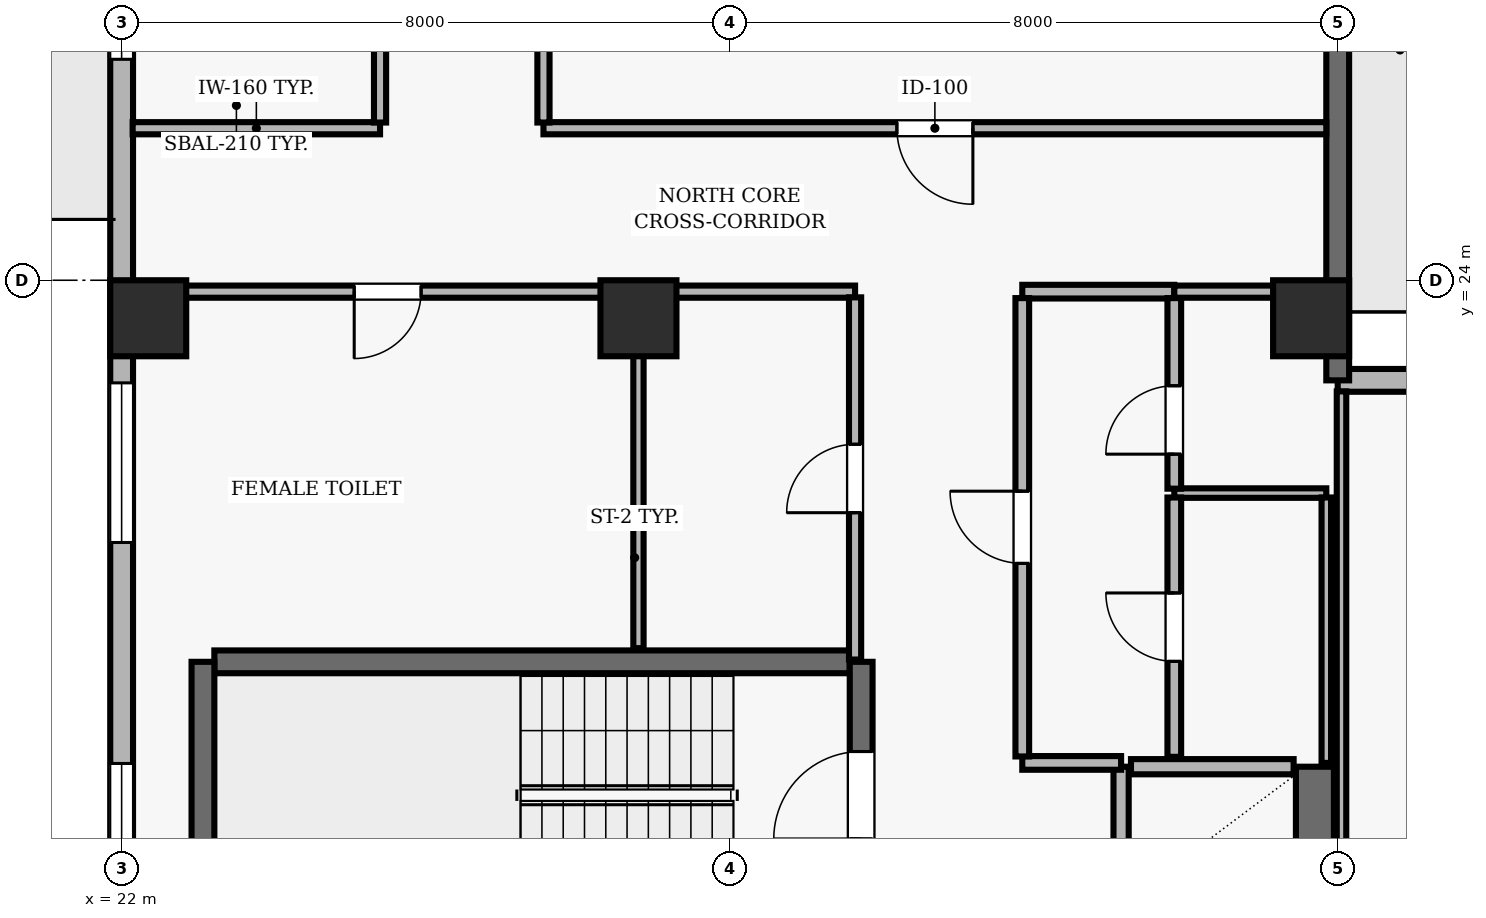
"""IFC4 building model, lengths in metres.
Left out: names, types, materials, properties, quantities, classifications, styles, units other than length and angle.
Written with IfcOpenShell. Run it as: python <this file> out.ifc"""

import sys

from ifc_helpers import new_model, si_unit, direction, frame, frame_2d, origin, origin_2d, place, context, subcontext, project, spatial, rectangle, extrude, element, fill, save


model = new_model("IFC4")
c1 = context("Model", 3, precision=1e-05, world=origin(), true_north=direction((0.0, 1.0)))
c2 = subcontext(c1, "Body", "Model", "MODEL_VIEW")
j1 = project(units=[si_unit("LENGTHUNIT", "METRE"), si_unit("PLANEANGLEUNIT", "RADIAN")], contexts=[c1])
p1 = place(None, origin())
s1 = spatial("IfcSite", under=j1, at=p1, CompositionType="ELEMENT")
p2 = place(p1, origin())
s2 = spatial("IfcBuilding", under=s1, at=p2, CompositionType="ELEMENT")
p3 = place(p2, frame((0.0, 0.0, 210.9)))
s3 = spatial("IfcBuildingStorey", under=s2, at=p3, CompositionType="ELEMENT", Elevation=210.9)
for number, where, z_axis, x_axis in (
    (1, (22.35, 23.5, 0.0), (0.0, 0.0, 1.0), (1.0, 0.0, 0.0)),
    (2, (28.8, 23.5, 0.0), (0.0, 0.0, 1.0), (1.0, 0.0, 0.0)),
    (3, (37.65, 23.5, 0.0), (0.0, 0.0, 1.0), (1.0, 0.0, 0.0)),
):
    element("IfcColumn", number, at=place(p3, frame(where, z_axis=z_axis, x_axis=x_axis)), inside=s3, PredefinedType="COLUMN", context=c2, shape_type="SweptSolid", body=[
        extrude(rectangle(XDim=1.0, YDim=1.0, at=origin_2d()), origin(), (0.0, 0.0, 1.0), 3.9),
    ])
p4 = place(p3, frame((44.45, 22.683, 0.0), z_axis=(0.0, 0.0, 1.0), x_axis=(-1.0, 0.0, 0.0)))
e4 = element("IfcWall", 4, at=p4, inside=s3, PredefinedType="SOLIDWALL", context=c2, shape_type="SweptSolid", body=[
    extrude(rectangle(XDim=6.45, YDim=0.3, at=frame_2d((3.225, 0.0))), origin(), (0.0, 0.0, 1.0), 3.69),
])
p5 = place(p4, frame((2.025, 0.0, 0.9)))
e5 = element("IfcOpeningElement", 5, at=p5, cuts=e4, PredefinedType="OPENING", context=c2, shape_type="SweptSolid", body=[
    extrude(rectangle(XDim=2.4, YDim=2.2, at=frame_2d((1.2, 1.1))), frame((0.0, 0.16, 0.0), z_axis=(0.0, -1.0, 0.0), x_axis=(1.0, 0.0, 0.0)), (0.0, 0.0, 1.0), 0.32),
])
p6 = place(p3, frame((38.0, 22.683, 0.0), z_axis=(0.0, 0.0, 1.0), x_axis=(0.0, 1.0, 0.0)))
e6 = element("IfcWall", 6, at=p6, inside=s3, PredefinedType="SOLIDWALL", context=c2, shape_type="SweptSolid", body=[
    extrude(rectangle(XDim=18.017, YDim=0.3, at=frame_2d((9.008, 0.0))), origin(), (0.0, 0.0, 1.0), 3.69),
])
p7 = place(p6, frame((9.708, 0.0, 0.0)))
e7 = element("IfcOpeningElement", 7, at=p7, cuts=e6, PredefinedType="OPENING", context=c2, shape_type="SweptSolid", body=[
    extrude(rectangle(XDim=1.0, YDim=2.2, at=frame_2d((0.5, 1.1))), frame((0.0, 0.16, 0.0), z_axis=(0.0, -1.0, 0.0), x_axis=(1.0, 0.0, 0.0)), (0.0, 0.0, 1.0), 0.32),
])
p8 = place(p6, frame((13.964, 0.0, 0.9)))
e8 = element("IfcOpeningElement", 8, at=p8, cuts=e6, PredefinedType="OPENING", context=c2, shape_type="SweptSolid", body=[
    extrude(rectangle(XDim=3.0, YDim=2.2, at=frame_2d((1.5, 1.1))), frame((0.0, 0.16, 0.0), z_axis=(0.0, -1.0, 0.0), x_axis=(1.0, 0.0, 0.0)), (0.0, 0.0, 1.0), 0.32),
])
p9 = place(p3, frame((22.0, 40.7, 0.0), z_axis=(0.0, 0.0, 1.0), x_axis=(0.0, -1.0, 0.0)))
e9 = element("IfcWall", 9, at=p9, inside=s3, PredefinedType="SOLIDWALL", context=c2, shape_type="SweptSolid", body=[
    extrude(rectangle(XDim=38.2, YDim=0.3, at=frame_2d((19.1, 0.0))), origin(), (0.0, 0.0, 1.0), 3.69),
])
p10 = place(p9, frame((7.8, 0.0, 0.0)))
e10 = element("IfcOpeningElement", 10, at=p10, cuts=e9, PredefinedType="OPENING", context=c2, shape_type="SweptSolid", body=[
    extrude(rectangle(XDim=1.0, YDim=2.2, at=frame_2d((0.5, 1.1))), frame((0.0, 0.16, 0.0), z_axis=(0.0, -1.0, 0.0), x_axis=(1.0, 0.0, 0.0)), (0.0, 0.0, 1.0), 0.32),
])
p11 = place(p9, frame((1.679, 0.0, 0.9)))
e11 = element("IfcOpeningElement", 11, at=p11, cuts=e9, PredefinedType="OPENING", context=c2, shape_type="SweptSolid", body=[
    extrude(rectangle(XDim=2.1, YDim=1.6, at=frame_2d((1.05, 0.8))), frame((0.0, 0.16, 0.0), z_axis=(0.0, -1.0, 0.0), x_axis=(1.0, 0.0, 0.0)), (0.0, 0.0, 1.0), 0.32),
])
p12 = place(p9, frame((11.693, 0.0, 0.9)))
e12 = element("IfcOpeningElement", 12, at=p12, cuts=e9, PredefinedType="OPENING", context=c2, shape_type="SweptSolid", body=[
    extrude(rectangle(XDim=2.1, YDim=1.6, at=frame_2d((1.05, 0.8))), frame((0.0, 0.16, 0.0), z_axis=(0.0, -1.0, 0.0), x_axis=(1.0, 0.0, 0.0)), (0.0, 0.0, 1.0), 0.32),
])
p13 = place(p9, frame((18.05, 0.0, 0.9)))
e13 = element("IfcOpeningElement", 13, at=p13, cuts=e9, PredefinedType="OPENING", context=c2, shape_type="SweptSolid", body=[
    extrude(rectangle(XDim=2.1, YDim=1.6, at=frame_2d((1.05, 0.8))), frame((0.0, 0.16, 0.0), z_axis=(0.0, -1.0, 0.0), x_axis=(1.0, 0.0, 0.0)), (0.0, 0.0, 1.0), 0.32),
])
p14 = place(p9, frame((23.057, 0.0, 0.9)))
e14 = element("IfcOpeningElement", 14, at=p14, cuts=e9, PredefinedType="OPENING", context=c2, shape_type="SweptSolid", body=[
    extrude(rectangle(XDim=2.1, YDim=1.6, at=frame_2d((1.05, 0.8))), frame((0.0, 0.16, 0.0), z_axis=(0.0, -1.0, 0.0), x_axis=(1.0, 0.0, 0.0)), (0.0, 0.0, 1.0), 0.32),
])
p15 = place(p9, frame((28.964, 0.0, 0.9)))
e15 = element("IfcOpeningElement", 15, at=p15, cuts=e9, PredefinedType="OPENING", context=c2, shape_type="SweptSolid", body=[
    extrude(rectangle(XDim=2.1, YDim=1.6, at=frame_2d((1.05, 0.8))), frame((0.0, 0.16, 0.0), z_axis=(0.0, -1.0, 0.0), x_axis=(1.0, 0.0, 0.0)), (0.0, 0.0, 1.0), 0.32),
])
p16 = place(p3, frame((31.58, 18.98, 0.0), z_axis=(0.0, 0.0, 1.0), x_axis=(-1.0, 0.0, 0.0)))
e16 = element("IfcWall", 16, at=p16, inside=s3, PredefinedType="SHEAR", context=c2, shape_type="SweptSolid", body=[
    extrude(rectangle(XDim=8.36, YDim=0.3, at=frame_2d((4.18, 0.0))), origin(), (0.0, 0.0, 1.0), 3.69),
])
p17 = place(p3, frame((23.07, 18.98, 0.0), z_axis=(0.0, 0.0, 1.0), x_axis=(0.0, -1.0, 0.0)))
e17 = element("IfcWall", 17, at=p17, inside=s3, PredefinedType="SHEAR", context=c2, shape_type="SweptSolid", body=[
    extrude(rectangle(XDim=3.51, YDim=0.3, at=frame_2d((1.755, 0.0))), origin(), (0.0, 0.0, 1.0), 3.69),
])
p18 = place(p3, frame((31.73, 15.47, 0.0), z_axis=(0.0, 0.0, 1.0), x_axis=(0.0, 1.0, 0.0)))
e18 = element("IfcWall", 18, at=p18, inside=s3, PredefinedType="SHEAR", context=c2, shape_type="SweptSolid", body=[
    extrude(rectangle(XDim=3.51, YDim=0.3, at=frame_2d((1.755, 0.0))), origin(), (0.0, 0.0, 1.0), 3.69),
])
p19 = place(p18, frame((1.18, 0.0, 0.0)))
e19 = element("IfcOpeningElement", 19, at=p19, cuts=e18, PredefinedType="OPENING", context=c2, shape_type="SweptSolid", body=[
    extrude(rectangle(XDim=1.15, YDim=2.15, at=frame_2d((0.575, 1.075))), frame((0.0, 0.16, 0.0), z_axis=(0.0, -1.0, 0.0), x_axis=(1.0, 0.0, 0.0)), (0.0, 0.0, 1.0), 0.32),
])
p20 = place(p3, frame((35.15, 17.6, 0.0), z_axis=(0.0, 0.0, 1.0), x_axis=(0.0, -1.0, 0.0)))
e20 = element("IfcWall", 20, at=p20, inside=s3, PredefinedType="SOLIDWALL", context=c2, shape_type="SweptSolid", body=[
    extrude(rectangle(XDim=1.85, YDim=0.2, at=frame_2d((0.925, 0.0))), origin(), (0.0, 0.0, 1.0), 3.69),
])
p21 = place(p3, frame((37.7, 15.75, 0.0), z_axis=(0.0, 0.0, 1.0), x_axis=(0.0, 1.0, 0.0)))
e21 = element("IfcWall", 21, at=p21, inside=s3, PredefinedType="SHEAR", context=c2, shape_type="SweptSolid", body=[
    extrude(rectangle(XDim=1.85, YDim=0.5, at=frame_2d((0.925, 0.0))), origin(), (0.0, 0.0, 1.0), 3.69),
])
p22 = place(p3, frame((37.42, 17.6, 0.0), z_axis=(0.0, 0.0, 1.0), x_axis=(-1.0, 0.0, 0.0)))
e22 = element("IfcWall", 22, at=p22, inside=s3, PredefinedType="SOLIDWALL", context=c2, shape_type="SweptSolid", body=[
    extrude(rectangle(XDim=2.14, YDim=0.2, at=frame_2d((1.07, 0.0))), origin(), (0.0, 0.0, 1.0), 3.69),
])
p23 = place(p3, frame((25.4, 26.0, 0.0), z_axis=(0.0, 0.0, 1.0), x_axis=(-1.0, 0.0, 0.0)))
e23 = element("IfcWall", 23, at=p23, inside=s3, PredefinedType="PARTITIONING", context=c2, shape_type="SweptSolid", body=[
    extrude(rectangle(XDim=3.255, YDim=0.16, at=frame_2d((1.627, 0.0))), origin(), (0.0, 0.0, 1.0), 3.69),
])
p24 = place(p3, frame((28.8, 23.85, 0.0), z_axis=(0.0, 0.0, 1.0), x_axis=(-1.0, 0.0, 0.0)))
e24 = element("IfcWall", 24, at=p24, inside=s3, PredefinedType="PARTITIONING", context=c2, shape_type="SweptSolid", body=[
    extrude(rectangle(XDim=6.6, YDim=0.16, at=frame_2d((3.3, 0.0))), origin(), (0.0, 0.0, 1.0), 3.146),
])
p25 = place(p24, frame((2.86, 0.0, 0.0)))
e25 = element("IfcOpeningElement", 25, at=p25, cuts=e24, PredefinedType="OPENING", context=c2, shape_type="SweptSolid", body=[
    extrude(rectangle(XDim=0.88, YDim=2.1, at=frame_2d((0.44, 1.05))), frame((0.0, 0.09, 0.0), z_axis=(0.0, -1.0, 0.0), x_axis=(1.0, 0.0, 0.0)), (0.0, 0.0, 1.0), 0.18),
])
p26 = place(p3, frame((31.65, 23.85, 0.0), z_axis=(0.0, 0.0, 1.0), x_axis=(-1.0, 0.0, 0.0)))
e26 = element("IfcWall", 26, at=p26, inside=s3, PredefinedType="PARTITIONING", context=c2, shape_type="SweptSolid", body=[
    extrude(rectangle(XDim=2.85, YDim=0.16, at=frame_2d((1.425, 0.0))), origin(), (0.0, 0.0, 1.0), 3.146),
])
p27 = place(p3, frame((33.85, 17.65, 0.0), z_axis=(0.0, 0.0, 1.0), x_axis=(1.0, 0.0, 0.0)))
e27 = element("IfcWall", 27, at=p27, inside=s3, PredefinedType="PARTITIONING", context=c2, shape_type="SweptSolid", body=[
    extrude(rectangle(XDim=1.3, YDim=0.18, at=frame_2d((0.65, 0.0))), origin(), (0.0, 0.0, 1.0), 3.69),
])
p28 = place(p3, frame((35.85, 21.2, 0.0), z_axis=(0.0, 0.0, 1.0), x_axis=(1.0, 0.0, 0.0)))
e28 = element("IfcWall", 28, at=p28, inside=s3, PredefinedType="PARTITIONING", context=c2, shape_type="SweptSolid", body=[
    extrude(rectangle(XDim=2.0, YDim=0.125, at=frame_2d((1.0, 0.0))), origin(), (0.0, 0.0, 1.0), 3.146),
])
p29 = place(p3, frame((35.85, 23.85, 0.0), z_axis=(0.0, 0.0, 1.0), x_axis=(-1.0, 0.0, 0.0)))
e29 = element("IfcWall", 29, at=p29, inside=s3, PredefinedType="PARTITIONING", context=c2, shape_type="SweptSolid", body=[
    extrude(rectangle(XDim=2.0, YDim=0.18, at=frame_2d((1.0, 0.0))), origin(), (0.0, 0.0, 1.0), 3.146),
])
p30 = place(p3, frame((37.85, 23.85, 0.0), z_axis=(0.0, 0.0, 1.0), x_axis=(-1.0, 0.0, 0.0)))
e30 = element("IfcWall", 30, at=p30, inside=s3, PredefinedType="PARTITIONING", context=c2, shape_type="SweptSolid", body=[
    extrude(rectangle(XDim=2.0, YDim=0.16, at=frame_2d((1.0, 0.0))), origin(), (0.0, 0.0, 1.0), 3.146),
])
p31 = place(p3, frame((37.85, 26.0, 0.0), z_axis=(0.0, 0.0, 1.0), x_axis=(-1.0, 0.0, 0.0)))
e31 = element("IfcWall", 31, at=p31, inside=s3, PredefinedType="PARTITIONING", context=c2, shape_type="SweptSolid", body=[
    extrude(rectangle(XDim=10.3, YDim=0.16, at=frame_2d((5.15, 0.0))), origin(), (0.0, 0.0, 1.0), 3.69),
])
p32 = place(p31, frame((4.65, 0.0, 0.0)))
e32 = element("IfcOpeningElement", 32, at=p32, cuts=e31, PredefinedType="OPENING", context=c2, shape_type="SweptSolid", body=[
    extrude(rectangle(XDim=1.0, YDim=2.1, at=frame_2d((0.5, 1.05))), frame((0.0, 0.09, 0.0), z_axis=(0.0, -1.0, 0.0), x_axis=(1.0, 0.0, 0.0)), (0.0, 0.0, 1.0), 0.18),
])
p33 = place(p3, frame((25.4, 35.715, 0.0), z_axis=(0.0, 0.0, 1.0), x_axis=(0.0, -1.0, 0.0)))
e33 = element("IfcWall", 33, at=p33, inside=s3, PredefinedType="PARTITIONING", context=c2, shape_type="SweptSolid", body=[
    extrude(rectangle(XDim=9.64, YDim=0.16, at=frame_2d((4.82, 0.0))), origin(), (0.0, 0.0, 1.0), 3.69),
])
p34 = place(p33, frame((4.37, 0.0, 0.0)))
e34 = element("IfcOpeningElement", 34, at=p34, cuts=e33, PredefinedType="OPENING", context=c2, shape_type="SweptSolid", body=[
    extrude(rectangle(XDim=0.9, YDim=2.1, at=frame_2d((0.45, 1.05))), frame((0.0, 0.09, 0.0), z_axis=(0.0, -1.0, 0.0), x_axis=(1.0, 0.0, 0.0)), (0.0, 0.0, 1.0), 0.18),
])
p35 = place(p3, frame((27.55, 26.075, 0.0), z_axis=(0.0, 0.0, 1.0), x_axis=(0.0, 1.0, 0.0)))
e35 = element("IfcWall", 35, at=p35, inside=s3, PredefinedType="PARTITIONING", context=c2, shape_type="SweptSolid", body=[
    extrude(rectangle(XDim=9.657, YDim=0.16, at=frame_2d((4.829, 0.0))), origin(), (0.0, 0.0, 1.0), 3.69),
])
p36 = place(p3, frame((28.8, 23.775, 0.0), z_axis=(0.0, 0.0, 1.0), x_axis=(0.0, -1.0, 0.0)))
e36 = element("IfcWall", 36, at=p36, inside=s3, PredefinedType="PARTITIONING", context=c2, shape_type="SweptSolid", body=[
    extrude(rectangle(XDim=4.615, YDim=0.135, at=frame_2d((2.308, 0.0))), origin(), (0.0, 0.0, 1.0), 3.69),
])
p37 = place(p3, frame((31.65, 19.01, 0.0), z_axis=(0.0, 0.0, 1.0), x_axis=(0.0, 1.0, 0.0)))
e37 = element("IfcWall", 37, at=p37, inside=s3, PredefinedType="PARTITIONING", context=c2, shape_type="SweptSolid", body=[
    extrude(rectangle(XDim=4.765, YDim=0.16, at=frame_2d((2.382, 0.0))), origin(), (0.0, 0.0, 1.0), 3.69),
])
p38 = place(p37, frame((1.932, 0.0, 0.0)))
e38 = element("IfcOpeningElement", 38, at=p38, cuts=e37, PredefinedType="OPENING", context=c2, shape_type="SweptSolid", body=[
    extrude(rectangle(XDim=0.9, YDim=2.1, at=frame_2d((0.45, 1.05))), frame((0.0, 0.09, 0.0), z_axis=(0.0, -1.0, 0.0), x_axis=(1.0, 0.0, 0.0)), (0.0, 0.0, 1.0), 0.18),
])
p39 = place(p3, frame((33.85, 17.735, 0.0), z_axis=(0.0, 0.0, 1.0), x_axis=(0.0, 1.0, 0.0)))
e39 = element("IfcWall", 39, at=p39, inside=s3, PredefinedType="PARTITIONING", context=c2, shape_type="SweptSolid", body=[
    extrude(rectangle(XDim=6.03, YDim=0.18, at=frame_2d((3.015, 0.0))), origin(), (0.0, 0.0, 1.0), 3.69),
])
p40 = place(p39, frame((2.54, 0.0, 0.0)))
e40 = element("IfcOpeningElement", 40, at=p40, cuts=e39, PredefinedType="OPENING", context=c2, shape_type="SweptSolid", body=[
    extrude(rectangle(XDim=0.95, YDim=2.1, at=frame_2d((0.475, 1.05))), frame((0.0, 0.1, 0.0), z_axis=(0.0, -1.0, 0.0), x_axis=(1.0, 0.0, 0.0)), (0.0, 0.0, 1.0), 0.2),
])
p41 = place(p3, frame((35.85, 17.73, 0.0), z_axis=(0.0, 0.0, 1.0), x_axis=(0.0, 1.0, 0.0)))
e41 = element("IfcWall", 41, at=p41, inside=s3, PredefinedType="PARTITIONING", context=c2, shape_type="SweptSolid", body=[
    extrude(rectangle(XDim=3.412, YDim=0.18, at=frame_2d((1.706, 0.0))), origin(), (0.0, 0.0, 1.0), 3.69),
])
p42 = place(p41, frame((1.256, 0.0, 0.0)))
e42 = element("IfcOpeningElement", 42, at=p42, cuts=e41, PredefinedType="OPENING", context=c2, shape_type="SweptSolid", body=[
    extrude(rectangle(XDim=0.9, YDim=2.1, at=frame_2d((0.45, 1.05))), frame((0.0, 0.1, 0.0), z_axis=(0.0, -1.0, 0.0), x_axis=(1.0, 0.0, 0.0)), (0.0, 0.0, 1.0), 0.2),
])
p43 = place(p3, frame((35.85, 21.258, 0.0), z_axis=(0.0, 0.0, 1.0), x_axis=(0.0, 1.0, 0.0)))
e43 = element("IfcWall", 43, at=p43, inside=s3, PredefinedType="PARTITIONING", context=c2, shape_type="SweptSolid", body=[
    extrude(rectangle(XDim=2.507, YDim=0.18, at=frame_2d((1.253, 0.0))), origin(), (0.0, 0.0, 1.0), 3.69),
])
p44 = place(p43, frame((0.454, 0.0, 0.0)))
e44 = element("IfcOpeningElement", 44, at=p44, cuts=e43, PredefinedType="OPENING", context=c2, shape_type="SweptSolid", body=[
    extrude(rectangle(XDim=0.9, YDim=2.1, at=frame_2d((0.45, 1.05))), frame((0.0, 0.1, 0.0), z_axis=(0.0, -1.0, 0.0), x_axis=(1.0, 0.0, 0.0)), (0.0, 0.0, 1.0), 0.2),
])
p45 = place(p3, frame((37.85, 17.65, 0.0), z_axis=(0.0, 0.0, 1.0), x_axis=(0.0, 1.0, 0.0)))
e45 = element("IfcWall", 45, at=p45, inside=s3, PredefinedType="PARTITIONING", context=c2, shape_type="SweptSolid", body=[
    extrude(rectangle(XDim=3.492, YDim=0.125, at=frame_2d((1.746, 0.0))), origin(), (0.0, 0.0, 1.0), 3.146),
])
p46 = place(p3, frame((38.05, 22.538, 0.0), z_axis=(0.0, 0.0, 1.0), x_axis=(0.0, -1.0, 0.0)))
e46 = element("IfcWall", 46, at=p46, inside=s3, PredefinedType="PARTITIONING", context=c2, shape_type="SweptSolid", body=[
    extrude(rectangle(XDim=6.463, YDim=0.125, at=frame_2d((3.231, 0.0))), origin(), (0.0, 0.0, 1.0), 3.146),
])
p47 = place(p12, origin())
e47 = element("IfcWindow", 47, at=p47, inside=s3, PartitioningType="SINGLE_PANEL", PredefinedType="WINDOW", context=c2, shape_type="SweptSolid", body=[
    extrude(rectangle(XDim=2.1, YDim=1.6, at=frame_2d((1.05, 0.8))), frame((0.0, 0.03, 0.0), z_axis=(0.0, -1.0, 0.0), x_axis=(1.0, 0.0, 0.0)), (0.0, 0.0, 1.0), 0.06),
])
fill(e12, e47)
p48 = place(p13, origin())
e48 = element("IfcWindow", 48, at=p48, inside=s3, PartitioningType="SINGLE_PANEL", PredefinedType="WINDOW", context=c2, shape_type="SweptSolid", body=[
    extrude(rectangle(XDim=2.1, YDim=1.6, at=frame_2d((1.05, 0.8))), frame((0.0, 0.03, 0.0), z_axis=(0.0, -1.0, 0.0), x_axis=(1.0, 0.0, 0.0)), (0.0, 0.0, 1.0), 0.06),
])
fill(e13, e48)
p49 = place(p14, origin())
e49 = element("IfcWindow", 49, at=p49, inside=s3, PartitioningType="SINGLE_PANEL", PredefinedType="WINDOW", context=c2, shape_type="SweptSolid", body=[
    extrude(rectangle(XDim=2.1, YDim=1.6, at=frame_2d((1.05, 0.8))), frame((0.0, 0.03, 0.0), z_axis=(0.0, -1.0, 0.0), x_axis=(1.0, 0.0, 0.0)), (0.0, 0.0, 1.0), 0.06),
])
fill(e14, e49)
p50 = place(p19, origin())
e50 = element("IfcDoor", 50, at=p50, inside=s3, OperationType="SINGLE_SWING_LEFT", PredefinedType="DOOR", context=c2, shape_type="SweptSolid", body=[
    extrude(rectangle(XDim=1.15, YDim=2.15, at=frame_2d((0.575, 1.075))), frame((0.0, 0.025, 0.0), z_axis=(0.0, -1.0, 0.0), x_axis=(1.0, 0.0, 0.0)), (0.0, 0.0, 1.0), 0.05),
])
fill(e19, e50)
p51 = place(p40, origin())
e51 = element("IfcDoor", 51, at=p51, inside=s3, OperationType="SINGLE_SWING_RIGHT", PredefinedType="DOOR", context=c2, shape_type="SweptSolid", body=[
    extrude(rectangle(XDim=0.95, YDim=2.1, at=frame_2d((0.475, 1.05))), frame((0.0, 0.025, 0.0), z_axis=(0.0, -1.0, 0.0), x_axis=(1.0, 0.0, 0.0)), (0.0, 0.0, 1.0), 0.05),
])
fill(e40, e51)
p52 = place(p44, origin())
e52 = element("IfcDoor", 52, at=p52, inside=s3, OperationType="SINGLE_SWING_LEFT", PredefinedType="DOOR", context=c2, shape_type="SweptSolid", body=[
    extrude(rectangle(XDim=0.9, YDim=2.1, at=frame_2d((0.45, 1.05))), frame((0.0, 0.025, 0.0), z_axis=(0.0, -1.0, 0.0), x_axis=(1.0, 0.0, 0.0)), (0.0, 0.0, 1.0), 0.05),
])
fill(e44, e52)
p53 = place(p42, origin())
e53 = element("IfcDoor", 53, at=p53, inside=s3, OperationType="SINGLE_SWING_RIGHT", PredefinedType="DOOR", context=c2, shape_type="SweptSolid", body=[
    extrude(rectangle(XDim=0.9, YDim=2.1, at=frame_2d((0.45, 1.05))), frame((0.0, 0.025, 0.0), z_axis=(0.0, -1.0, 0.0), x_axis=(1.0, 0.0, 0.0)), (0.0, 0.0, 1.0), 0.05),
])
fill(e42, e53)
p54 = place(p38, origin())
e54 = element("IfcDoor", 54, at=p54, inside=s3, OperationType="SINGLE_SWING_LEFT", PredefinedType="DOOR", context=c2, shape_type="SweptSolid", body=[
    extrude(rectangle(XDim=0.9, YDim=2.1, at=frame_2d((0.45, 1.05))), frame((0.0, 0.025, 0.0), z_axis=(0.0, -1.0, 0.0), x_axis=(1.0, 0.0, 0.0)), (0.0, 0.0, 1.0), 0.05),
])
fill(e38, e54)
p55 = place(p25, origin())
e55 = element("IfcDoor", 55, at=p55, inside=s3, OperationType="SINGLE_SWING_RIGHT", PredefinedType="DOOR", context=c2, shape_type="SweptSolid", body=[
    extrude(rectangle(XDim=0.88, YDim=2.1, at=frame_2d((0.44, 1.05))), frame((0.0, 0.025, 0.0), z_axis=(0.0, -1.0, 0.0), x_axis=(1.0, 0.0, 0.0)), (0.0, 0.0, 1.0), 0.05),
])
fill(e25, e55)
p56 = place(p32, origin())
e56 = element("IfcDoor", 56, at=p56, inside=s3, OperationType="SINGLE_SWING_LEFT", PredefinedType="DOOR", context=c2, shape_type="SweptSolid", body=[
    extrude(rectangle(XDim=1.0, YDim=2.1, at=frame_2d((0.5, 1.05))), frame((0.0, 0.025, 0.0), z_axis=(0.0, -1.0, 0.0), x_axis=(1.0, 0.0, 0.0)), (0.0, 0.0, 1.0), 0.05),
])
fill(e32, e56)
save(model, sys.argv[1])
